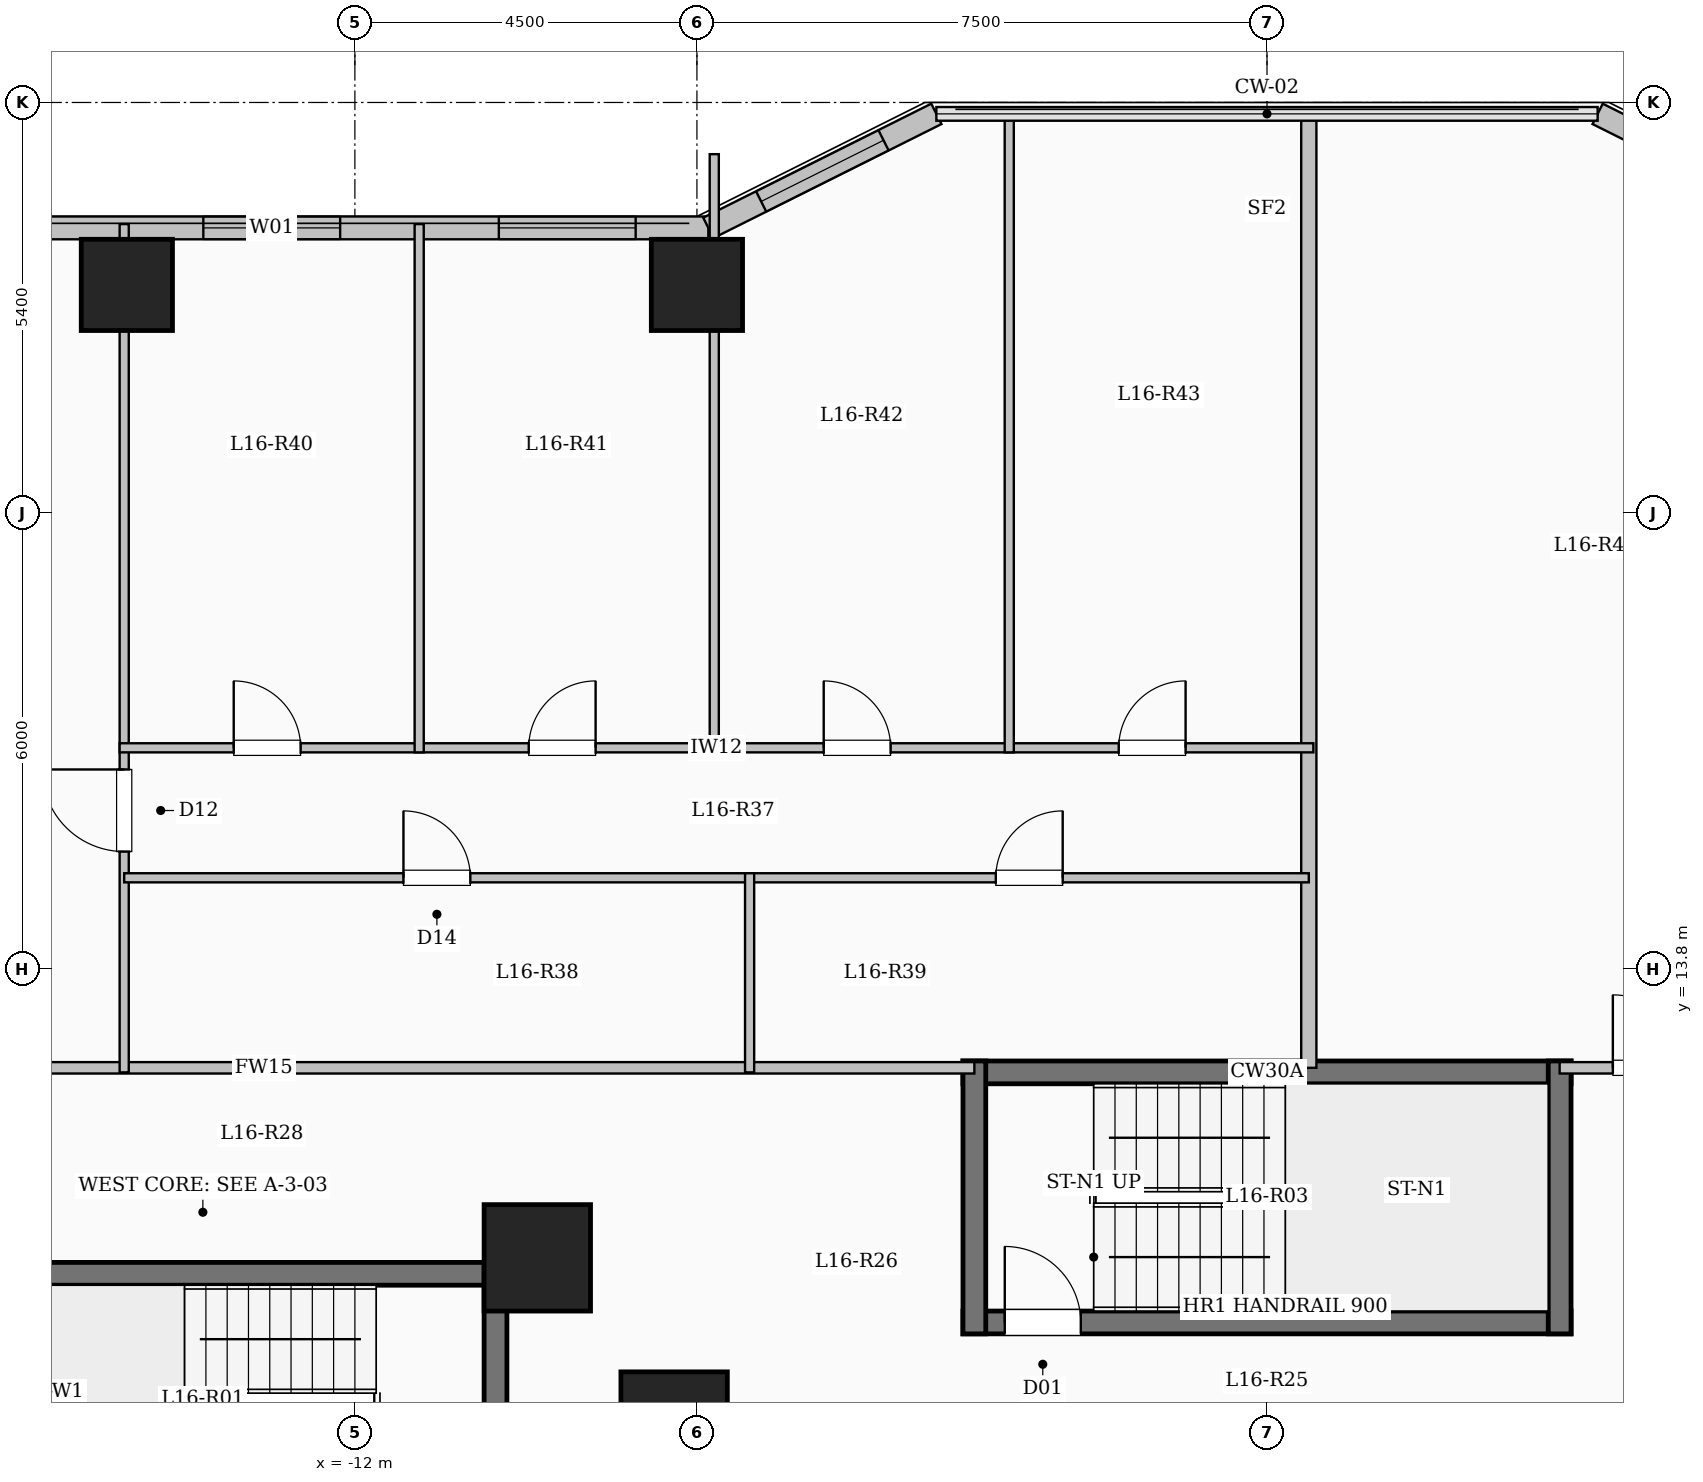
"""IFC4 building model, lengths in metres.
Left out: names, types, materials, properties, quantities, classifications, styles, units other than length and angle.
Written with IfcOpenShell. Run it as: python <this file> out.ifc"""

import sys

from ifc_helpers import new_model, si_unit, direction, frame, frame_2d, origin, origin_2d, place, context, subcontext, project, spatial, rectangle, extrude, element, fill, save


model = new_model("IFC4")
c1 = context("Model", 3, precision=1e-05, world=origin(), true_north=direction((0.0, 1.0)))
c2 = subcontext(c1, "Body", "Model", "MODEL_VIEW")
j1 = project(units=[si_unit("LENGTHUNIT", "METRE"), si_unit("PLANEANGLEUNIT", "RADIAN")], contexts=[c1])
p1 = place(None, origin())
s1 = spatial("IfcSite", under=j1, at=p1, CompositionType="ELEMENT")
p2 = place(p1, origin())
s2 = spatial("IfcBuilding", under=s1, at=p2, CompositionType="ELEMENT")
p3 = place(p2, frame((0.0, 0.0, 60.85)))
s3 = spatial("IfcBuildingStorey", under=s2, at=p3, CompositionType="ELEMENT", Elevation=60.85)
for number, where, z_axis, x_axis in (
    (1, (-7.8, 7.8, 0.0), (0.0, 0.0, 1.0), (1.0, 0.0, 0.0)),
    (2, (-9.6, 10.0, 0.0), (0.0, 0.0, 1.0), (1.0, 0.0, 0.0)),
):
    element("IfcColumn", number, at=place(p3, frame(where, z_axis=z_axis, x_axis=x_axis)), inside=s3, PredefinedType="COLUMN", context=c2, shape_type="SweptSolid", body=[
        extrude(rectangle(XDim=1.4, YDim=1.4, at=origin_2d()), origin(), (0.0, 0.0, 1.0), 3.35),
    ])
for number, where, z_axis, x_axis in (
    (3, (-15.0, 22.8, 0.0), (0.0, 0.0, 1.0), (1.0, 0.0, 0.0)),
    (4, (-7.5, 22.8, 0.0), (0.0, 0.0, 1.0), (1.0, 0.0, 0.0)),
):
    element("IfcColumn", number, at=place(p3, frame(where, z_axis=z_axis, x_axis=x_axis)), inside=s3, PredefinedType="COLUMN", context=c2, shape_type="SweptSolid", body=[
        extrude(rectangle(XDim=1.2, YDim=1.2, at=origin_2d()), origin(), (0.0, 0.0, 1.0), 3.35),
    ])
p4 = place(p3, frame((-22.65, 23.55, 0.0), z_axis=(0.0, 0.0, 1.0), x_axis=(1.0, 0.0, 0.0)))
e5 = element("IfcWall", 5, at=p4, inside=s3, PredefinedType="SOLIDWALL", context=c2, shape_type="SweptSolid", body=[
    extrude(rectangle(XDim=15.3, YDim=0.3, at=frame_2d((7.65, 0.0))), origin(), (0.0, 0.0, 1.0), 3.05),
])
p5 = place(p4, frame((2.637, 0.0, 0.9)))
e6 = element("IfcOpeningElement", 6, at=p5, cuts=e5, PredefinedType="OPENING", context=c2, shape_type="SweptSolid", body=[
    extrude(rectangle(XDim=2.4, YDim=1.8, at=frame_2d((1.2, 0.9))), frame((0.0, 0.16, 0.0), z_axis=(0.0, -1.0, 0.0), x_axis=(1.0, 0.0, 0.0)), (0.0, 0.0, 1.0), 0.32),
])
p6 = place(p4, frame((8.656, 0.0, 0.9)))
e7 = element("IfcOpeningElement", 7, at=p6, cuts=e5, PredefinedType="OPENING", context=c2, shape_type="SweptSolid", body=[
    extrude(rectangle(XDim=1.8, YDim=1.65, at=frame_2d((0.9, 0.825))), frame((0.0, 0.16, 0.0), z_axis=(0.0, -1.0, 0.0), x_axis=(1.0, 0.0, 0.0)), (0.0, 0.0, 1.0), 0.32),
])
p7 = place(p4, frame((12.544, 0.0, 0.9)))
e8 = element("IfcOpeningElement", 8, at=p7, cuts=e5, PredefinedType="OPENING", context=c2, shape_type="SweptSolid", body=[
    extrude(rectangle(XDim=1.8, YDim=1.65, at=frame_2d((0.9, 0.825))), frame((0.0, 0.16, 0.0), z_axis=(0.0, -1.0, 0.0), x_axis=(1.0, 0.0, 0.0)), (0.0, 0.0, 1.0), 0.32),
])
p8 = place(p3, frame((-7.35, 23.55, 0.0), z_axis=(0.0, 0.0, 1.0), x_axis=(0.894427191, 0.4472135955, 0.0)))
e9 = element("IfcWall", 9, at=p8, inside=s3, PredefinedType="SOLIDWALL", context=c2, shape_type="SweptSolid", body=[
    extrude(rectangle(XDim=3.354, YDim=0.3, at=frame_2d((1.677, 0.0))), origin(), (0.0, 0.0, 1.0), 3.05),
])
p9 = place(p8, frame((0.777, 0.0, 0.9)))
e10 = element("IfcOpeningElement", 10, at=p9, cuts=e9, PredefinedType="OPENING", context=c2, shape_type="SweptSolid", body=[
    extrude(rectangle(XDim=1.8, YDim=1.65, at=frame_2d((0.9, 0.825))), frame((0.0, 0.16, 0.0), z_axis=(0.0, -1.0, 0.0), x_axis=(1.0, 0.0, 0.0)), (0.0, 0.0, 1.0), 0.32),
])
p10 = place(p3, frame((4.35, 25.05, 0.0), z_axis=(0.0, 0.0, 1.0), x_axis=(0.894427191, -0.4472135955, 0.0)))
e11 = element("IfcWall", 11, at=p10, inside=s3, PredefinedType="SOLIDWALL", context=c2, shape_type="SweptSolid", body=[
    extrude(rectangle(XDim=3.354, YDim=0.3, at=frame_2d((1.677, 0.0))), origin(), (0.0, 0.0, 1.0), 3.05),
])
p11 = place(p10, frame((1.653, 0.0, 0.95)))
e12 = element("IfcOpeningElement", 12, at=p11, cuts=e11, PredefinedType="OPENING", context=c2, shape_type="SweptSolid", body=[
    extrude(rectangle(XDim=1.2, YDim=1.5, at=frame_2d((0.6, 0.75))), frame((0.0, 0.16, 0.0), z_axis=(0.0, -1.0, 0.0), x_axis=(1.0, 0.0, 0.0)), (0.0, 0.0, 1.0), 0.32),
])
p12 = place(p3, frame((-18.0, 9.79, 0.0), z_axis=(0.0, 0.0, 1.0), x_axis=(1.0, 0.0, 0.0)))
e13 = element("IfcWall", 13, at=p12, inside=s3, PredefinedType="SHEAR", context=c2, shape_type="SweptSolid", body=[
    extrude(rectangle(XDim=8.0, YDim=0.3, at=frame_2d((4.0, 0.0))), origin(), (0.0, 0.0, 1.0), 3.35),
])
p13 = place(p3, frame((-10.15, 6.35, 0.0), z_axis=(0.0, 0.0, 1.0), x_axis=(0.0, 1.0, 0.0)))
e14 = element("IfcWall", 14, at=p13, inside=s3, PredefinedType="SHEAR", context=c2, shape_type="SweptSolid", body=[
    extrude(rectangle(XDim=3.59, YDim=0.3, at=frame_2d((1.795, 0.0))), origin(), (0.0, 0.0, 1.0), 3.35),
])
p14 = place(p3, frame((-4.0, 12.44, 0.0), z_axis=(0.0, 0.0, 1.0), x_axis=(1.0, 0.0, 0.0)))
e15 = element("IfcWall", 15, at=p14, inside=s3, PredefinedType="SHEAR", context=c2, shape_type="SweptSolid", body=[
    extrude(rectangle(XDim=8.0, YDim=0.3, at=frame_2d((4.0, 0.0))), origin(), (0.0, 0.0, 1.0), 3.35),
])
p15 = place(p3, frame((-4.0, 9.15, 0.0), z_axis=(0.0, 0.0, 1.0), x_axis=(1.0, 0.0, 0.0)))
e16 = element("IfcWall", 16, at=p15, inside=s3, PredefinedType="SHEAR", context=c2, shape_type="SweptSolid", body=[
    extrude(rectangle(XDim=8.0, YDim=0.3, at=frame_2d((4.0, 0.0))), origin(), (0.0, 0.0, 1.0), 3.35),
])
p16 = place(p15, frame((0.55, 0.0, 0.0)))
e17 = element("IfcOpeningElement", 17, at=p16, cuts=e16, PredefinedType="OPENING", context=c2, shape_type="SweptSolid", body=[
    extrude(rectangle(XDim=1.0, YDim=2.15, at=frame_2d((0.5, 1.075))), frame((0.0, 0.16, 0.0), z_axis=(0.0, -1.0, 0.0), x_axis=(1.0, 0.0, 0.0)), (0.0, 0.0, 1.0), 0.32),
])
for number, where, z_axis, x_axis in (
    (18, (-3.85, 9.0, 0.0), (0.0, 0.0, 1.0), (0.0, 1.0, 0.0)),
    (19, (3.85, 9.0, 0.0), (0.0, 0.0, 1.0), (0.0, 1.0, 0.0)),
):
    element("IfcWall", number, at=place(p3, frame(where, z_axis=z_axis, x_axis=x_axis)), inside=s3, PredefinedType="SHEAR", context=c2, shape_type="SweptSolid", body=[
        extrude(rectangle(XDim=3.59, YDim=0.3, at=frame_2d((1.795, 0.0))), origin(), (0.0, 0.0, 1.0), 3.35),
    ])
p17 = place(p3, frame((-22.55, 12.5, 0.0), z_axis=(0.0, 0.0, 1.0), x_axis=(1.0, 0.0, 0.0)))
e20 = element("IfcWall", 20, at=p17, inside=s3, PredefinedType="PARTITIONING", context=c2, shape_type="SweptSolid", body=[
    extrude(rectangle(XDim=18.7, YDim=0.15, at=frame_2d((9.35, 0.0))), origin(), (0.0, 0.0, 1.0), 3.05),
])
p18 = place(p17, frame((0.7, 0.0, 0.0)))
e21 = element("IfcOpeningElement", 21, at=p18, cuts=e20, PredefinedType="OPENING", context=c2, shape_type="SweptSolid", body=[
    extrude(rectangle(XDim=0.96, YDim=2.15, at=frame_2d((0.48, 1.075))), frame((0.0, 0.085, 0.0), z_axis=(0.0, -1.0, 0.0), x_axis=(1.0, 0.0, 0.0)), (0.0, 0.0, 1.0), 0.17),
])
p19 = place(p3, frame((3.85, 12.5, 0.0), z_axis=(0.0, 0.0, 1.0), x_axis=(1.0, 0.0, 0.0)))
e22 = element("IfcWall", 22, at=p19, inside=s3, PredefinedType="PARTITIONING", context=c2, shape_type="SweptSolid", body=[
    extrude(rectangle(XDim=18.7, YDim=0.15, at=frame_2d((9.35, 0.0))), origin(), (0.0, 0.0, 1.0), 3.05),
])
p20 = place(p19, frame((0.7, 0.0, 0.0)))
e23 = element("IfcOpeningElement", 23, at=p20, cuts=e22, PredefinedType="OPENING", context=c2, shape_type="SweptSolid", body=[
    extrude(rectangle(XDim=0.96, YDim=2.15, at=frame_2d((0.48, 1.075))), frame((0.0, 0.085, 0.0), z_axis=(0.0, -1.0, 0.0), x_axis=(1.0, 0.0, 0.0)), (0.0, 0.0, 1.0), 0.17),
])
p21 = place(p3, frame((0.55, 12.5, 0.0), z_axis=(0.0, 0.0, 1.0), x_axis=(0.0, 1.0, 0.0)))
e24 = element("IfcWall", 24, at=p21, inside=s3, PredefinedType="SOLIDWALL", context=c2, shape_type="SweptSolid", body=[
    extrude(rectangle(XDim=12.58, YDim=0.2, at=frame_2d((6.29, 0.0))), origin(), (0.0, 0.0, 1.0), 3.05),
])
p22 = place(p3, frame((-15.035, 12.44, 0.0), z_axis=(0.0, 0.0, 1.0), x_axis=(0.0, 1.0, 0.0)))
e25 = element("IfcWall", 25, at=p22, inside=s3, PredefinedType="PARTITIONING", context=c2, shape_type="SweptSolid", body=[
    extrude(rectangle(XDim=11.16, YDim=0.12, at=frame_2d((5.58, 0.0))), origin(), (0.0, 0.0, 1.0), 2.385),
])
p23 = place(p22, frame((2.905, 0.0, 0.0)))
e26 = element("IfcOpeningElement", 26, at=p23, cuts=e25, PredefinedType="OPENING", context=c2, shape_type="SweptSolid", body=[
    extrude(rectangle(XDim=1.08, YDim=2.15, at=frame_2d((0.54, 1.075))), frame((0.0, 0.07, 0.0), z_axis=(0.0, -1.0, 0.0), x_axis=(1.0, 0.0, 0.0)), (0.0, 0.0, 1.0), 0.14),
])
p24 = place(p3, frame((-15.035, 15.0, 0.0), z_axis=(0.0, 0.0, 1.0), x_axis=(1.0, 0.0, 0.0)))
e27 = element("IfcWall", 27, at=p24, inside=s3, PredefinedType="PARTITIONING", context=c2, shape_type="SweptSolid", body=[
    extrude(rectangle(XDim=8.228, YDim=0.12, at=frame_2d((4.114, 0.0))), origin(), (0.0, 0.0, 1.0), 2.535),
])
p25 = place(p24, frame((3.674, 0.0, 0.0)))
e28 = element("IfcOpeningElement", 28, at=p25, cuts=e27, PredefinedType="OPENING", context=c2, shape_type="SweptSolid", body=[
    extrude(rectangle(XDim=0.88, YDim=2.1, at=frame_2d((0.44, 1.05))), frame((0.0, 0.07, 0.0), z_axis=(0.0, -1.0, 0.0), x_axis=(1.0, 0.0, 0.0)), (0.0, 0.0, 1.0), 0.14),
])
p26 = place(p3, frame((-6.807, 15.0, 0.0), z_axis=(0.0, 0.0, 1.0), x_axis=(1.0, 0.0, 0.0)))
e29 = element("IfcWall", 29, at=p26, inside=s3, PredefinedType="PARTITIONING", context=c2, shape_type="SweptSolid", body=[
    extrude(rectangle(XDim=7.357, YDim=0.12, at=frame_2d((3.678, 0.0))), origin(), (0.0, 0.0, 1.0), 2.535),
])
p27 = place(p26, frame((3.239, 0.0, 0.0)))
e30 = element("IfcOpeningElement", 30, at=p27, cuts=e29, PredefinedType="OPENING", context=c2, shape_type="SweptSolid", body=[
    extrude(rectangle(XDim=0.88, YDim=2.1, at=frame_2d((0.44, 1.05))), frame((0.0, 0.07, 0.0), z_axis=(0.0, -1.0, 0.0), x_axis=(1.0, 0.0, 0.0)), (0.0, 0.0, 1.0), 0.14),
])
p28 = place(p3, frame((-15.095, 16.71, 0.0), z_axis=(0.0, 0.0, 1.0), x_axis=(1.0, 0.0, 0.0)))
e31 = element("IfcWall", 31, at=p28, inside=s3, PredefinedType="PARTITIONING", context=c2, shape_type="SweptSolid", body=[
    extrude(rectangle(XDim=15.705, YDim=0.12, at=frame_2d((7.853, 0.0))), origin(), (0.0, 0.0, 1.0), 2.535),
])
p29 = place(p28, frame((1.501, 0.0, 0.0)))
e32 = element("IfcOpeningElement", 32, at=p29, cuts=e31, PredefinedType="OPENING", context=c2, shape_type="SweptSolid", body=[
    extrude(rectangle(XDim=0.88, YDim=2.1, at=frame_2d((0.44, 1.05))), frame((0.0, 0.07, 0.0), z_axis=(0.0, -1.0, 0.0), x_axis=(1.0, 0.0, 0.0)), (0.0, 0.0, 1.0), 0.14),
])
p30 = place(p28, frame((5.382, 0.0, 0.0)))
e33 = element("IfcOpeningElement", 33, at=p30, cuts=e31, PredefinedType="OPENING", context=c2, shape_type="SweptSolid", body=[
    extrude(rectangle(XDim=0.88, YDim=2.1, at=frame_2d((0.44, 1.05))), frame((0.0, 0.07, 0.0), z_axis=(0.0, -1.0, 0.0), x_axis=(1.0, 0.0, 0.0)), (0.0, 0.0, 1.0), 0.14),
])
p31 = place(p28, frame((9.263, 0.0, 0.0)))
e34 = element("IfcOpeningElement", 34, at=p31, cuts=e31, PredefinedType="OPENING", context=c2, shape_type="SweptSolid", body=[
    extrude(rectangle(XDim=0.88, YDim=2.1, at=frame_2d((0.44, 1.05))), frame((0.0, 0.07, 0.0), z_axis=(0.0, -1.0, 0.0), x_axis=(1.0, 0.0, 0.0)), (0.0, 0.0, 1.0), 0.14),
])
p32 = place(p28, frame((13.144, 0.0, 0.0)))
e35 = element("IfcOpeningElement", 35, at=p32, cuts=e31, PredefinedType="OPENING", context=c2, shape_type="SweptSolid", body=[
    extrude(rectangle(XDim=0.88, YDim=2.1, at=frame_2d((0.44, 1.05))), frame((0.0, 0.07, 0.0), z_axis=(0.0, -1.0, 0.0), x_axis=(1.0, 0.0, 0.0)), (0.0, 0.0, 1.0), 0.14),
])
p33 = place(p3, frame((-6.807, 12.44, 0.0), z_axis=(0.0, 0.0, 1.0), x_axis=(0.0, 1.0, 0.0)))
e36 = element("IfcWall", 36, at=p33, inside=s3, PredefinedType="PARTITIONING", context=c2, shape_type="SweptSolid", body=[
    extrude(rectangle(XDim=2.62, YDim=0.12, at=frame_2d((1.31, 0.0))), origin(), (0.0, 0.0, 1.0), 3.05),
])
p34 = place(p3, frame((-11.154, 16.65, 0.0), z_axis=(0.0, 0.0, 1.0), x_axis=(0.0, 1.0, 0.0)))
e37 = element("IfcWall", 37, at=p34, inside=s3, PredefinedType="PARTITIONING", context=c2, shape_type="SweptSolid", body=[
    extrude(rectangle(XDim=6.95, YDim=0.12, at=frame_2d((3.475, 0.0))), origin(), (0.0, 0.0, 1.0), 3.05),
])
p35 = place(p3, frame((-7.272, 16.65, 0.0), z_axis=(0.0, 0.0, 1.0), x_axis=(0.0, 1.0, 0.0)))
e38 = element("IfcWall", 38, at=p35, inside=s3, PredefinedType="PARTITIONING", context=c2, shape_type="SweptSolid", body=[
    extrude(rectangle(XDim=7.87, YDim=0.12, at=frame_2d((3.935, 0.0))), origin(), (0.0, 0.0, 1.0), 2.385),
])
p36 = place(p3, frame((-3.391, 16.65, 0.0), z_axis=(0.0, 0.0, 1.0), x_axis=(0.0, 1.0, 0.0)))
e39 = element("IfcWall", 39, at=p36, inside=s3, PredefinedType="PARTITIONING", context=c2, shape_type="SweptSolid", body=[
    extrude(rectangle(XDim=8.43, YDim=0.12, at=frame_2d((4.215, 0.0))), origin(), (0.0, 0.0, 1.0), 3.05),
])
p37 = place(p6, origin())
e40 = element("IfcWindow", 40, at=p37, inside=s3, PartitioningType="SINGLE_PANEL", PredefinedType="WINDOW", context=c2, shape_type="SweptSolid", body=[
    extrude(rectangle(XDim=1.8, YDim=1.65, at=frame_2d((0.9, 0.825))), frame((0.0, 0.03, 0.0), z_axis=(0.0, -1.0, 0.0), x_axis=(1.0, 0.0, 0.0)), (0.0, 0.0, 1.0), 0.06),
])
fill(e7, e40)
p38 = place(p7, origin())
e41 = element("IfcWindow", 41, at=p38, inside=s3, PartitioningType="SINGLE_PANEL", PredefinedType="WINDOW", context=c2, shape_type="SweptSolid", body=[
    extrude(rectangle(XDim=1.8, YDim=1.65, at=frame_2d((0.9, 0.825))), frame((0.0, 0.03, 0.0), z_axis=(0.0, -1.0, 0.0), x_axis=(1.0, 0.0, 0.0)), (0.0, 0.0, 1.0), 0.06),
])
fill(e8, e41)
p39 = place(p9, origin())
e42 = element("IfcWindow", 42, at=p39, inside=s3, PartitioningType="SINGLE_PANEL", PredefinedType="WINDOW", context=c2, shape_type="SweptSolid", body=[
    extrude(rectangle(XDim=1.8, YDim=1.65, at=frame_2d((0.9, 0.825))), frame((0.0, 0.03, 0.0), z_axis=(0.0, -1.0, 0.0), x_axis=(1.0, 0.0, 0.0)), (0.0, 0.0, 1.0), 0.06),
])
fill(e10, e42)
p40 = place(p16, origin())
e43 = element("IfcDoor", 43, at=p40, inside=s3, OperationType="SINGLE_SWING_LEFT", PredefinedType="DOOR", context=c2, shape_type="SweptSolid", body=[
    extrude(rectangle(XDim=1.0, YDim=2.15, at=frame_2d((0.5, 1.075))), frame((0.0, 0.025, 0.0), z_axis=(0.0, -1.0, 0.0), x_axis=(1.0, 0.0, 0.0)), (0.0, 0.0, 1.0), 0.05),
])
fill(e17, e43)
p41 = place(p23, origin())
e44 = element("IfcDoor", 44, at=p41, inside=s3, OperationType="SINGLE_SWING_RIGHT", PredefinedType="DOOR", context=c2, shape_type="SweptSolid", body=[
    extrude(rectangle(XDim=1.08, YDim=2.15, at=frame_2d((0.54, 1.075))), frame((0.0, 0.025, 0.0), z_axis=(0.0, -1.0, 0.0), x_axis=(1.0, 0.0, 0.0)), (0.0, 0.0, 1.0), 0.05),
])
fill(e26, e44)
p42 = place(p25, origin())
e45 = element("IfcDoor", 45, at=p42, inside=s3, OperationType="SINGLE_SWING_LEFT", PredefinedType="DOOR", context=c2, shape_type="SweptSolid", body=[
    extrude(rectangle(XDim=0.88, YDim=2.1, at=frame_2d((0.44, 1.05))), frame((0.0, 0.025, 0.0), z_axis=(0.0, -1.0, 0.0), x_axis=(1.0, 0.0, 0.0)), (0.0, 0.0, 1.0), 0.05),
])
fill(e28, e45)
p43 = place(p27, origin())
e46 = element("IfcDoor", 46, at=p43, inside=s3, OperationType="SINGLE_SWING_RIGHT", PredefinedType="DOOR", context=c2, shape_type="SweptSolid", body=[
    extrude(rectangle(XDim=0.88, YDim=2.1, at=frame_2d((0.44, 1.05))), frame((0.0, 0.025, 0.0), z_axis=(0.0, -1.0, 0.0), x_axis=(1.0, 0.0, 0.0)), (0.0, 0.0, 1.0), 0.05),
])
fill(e30, e46)
p44 = place(p29, origin())
e47 = element("IfcDoor", 47, at=p44, inside=s3, OperationType="SINGLE_SWING_LEFT", PredefinedType="DOOR", context=c2, shape_type="SweptSolid", body=[
    extrude(rectangle(XDim=0.88, YDim=2.1, at=frame_2d((0.44, 1.05))), frame((0.0, 0.025, 0.0), z_axis=(0.0, -1.0, 0.0), x_axis=(1.0, 0.0, 0.0)), (0.0, 0.0, 1.0), 0.05),
])
fill(e32, e47)
p45 = place(p30, origin())
e48 = element("IfcDoor", 48, at=p45, inside=s3, OperationType="SINGLE_SWING_RIGHT", PredefinedType="DOOR", context=c2, shape_type="SweptSolid", body=[
    extrude(rectangle(XDim=0.88, YDim=2.1, at=frame_2d((0.44, 1.05))), frame((0.0, 0.025, 0.0), z_axis=(0.0, -1.0, 0.0), x_axis=(1.0, 0.0, 0.0)), (0.0, 0.0, 1.0), 0.05),
])
fill(e33, e48)
p46 = place(p31, origin())
e49 = element("IfcDoor", 49, at=p46, inside=s3, OperationType="SINGLE_SWING_LEFT", PredefinedType="DOOR", context=c2, shape_type="SweptSolid", body=[
    extrude(rectangle(XDim=0.88, YDim=2.1, at=frame_2d((0.44, 1.05))), frame((0.0, 0.025, 0.0), z_axis=(0.0, -1.0, 0.0), x_axis=(1.0, 0.0, 0.0)), (0.0, 0.0, 1.0), 0.05),
])
fill(e34, e49)
p47 = place(p32, origin())
e50 = element("IfcDoor", 50, at=p47, inside=s3, OperationType="SINGLE_SWING_RIGHT", PredefinedType="DOOR", context=c2, shape_type="SweptSolid", body=[
    extrude(rectangle(XDim=0.88, YDim=2.1, at=frame_2d((0.44, 1.05))), frame((0.0, 0.025, 0.0), z_axis=(0.0, -1.0, 0.0), x_axis=(1.0, 0.0, 0.0)), (0.0, 0.0, 1.0), 0.05),
])
fill(e35, e50)
p48 = place(p20, origin())
e51 = element("IfcDoor", 51, at=p48, inside=s3, OperationType="SINGLE_SWING_LEFT", PredefinedType="DOOR", context=c2, shape_type="SweptSolid", body=[
    extrude(rectangle(XDim=0.96, YDim=2.15, at=frame_2d((0.48, 1.075))), frame((0.0, 0.025, 0.0), z_axis=(0.0, -1.0, 0.0), x_axis=(1.0, 0.0, 0.0)), (0.0, 0.0, 1.0), 0.05),
])
fill(e23, e51)
save(model, sys.argv[1])
